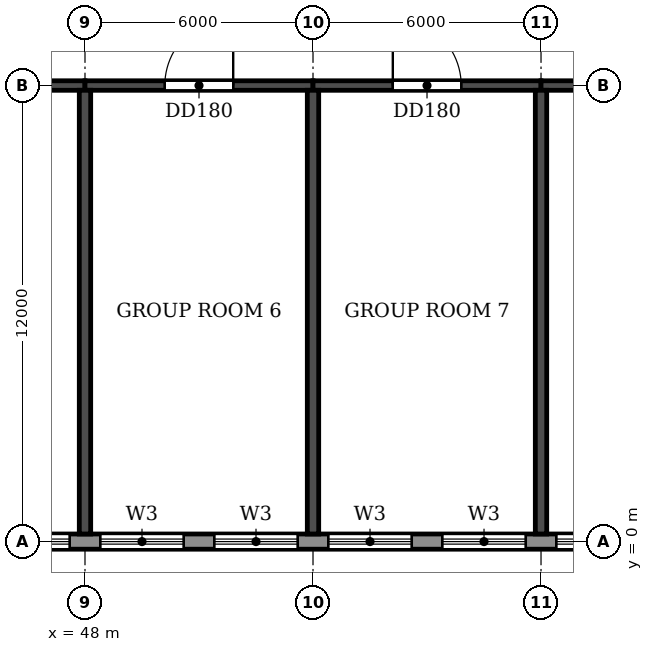
"""IFC4 building model, lengths in metres.
Left out: names, types, materials, properties, quantities, classifications, styles, units other than length and angle.
Written with IfcOpenShell. Run it as: python <this file> out.ifc"""

import sys

from ifc_helpers import new_model, si_unit, direction, frame, frame_2d, origin, place, context, subcontext, project, spatial, rectangle, extrude, element, fill, save


model = new_model("IFC4")
c1 = context("Model", 3, precision=1e-05, world=origin(), true_north=direction((0.0, 1.0)))
c2 = subcontext(c1, "Body", "Model", "MODEL_VIEW")
j1 = project(units=[si_unit("LENGTHUNIT", "METRE"), si_unit("PLANEANGLEUNIT", "RADIAN")], contexts=[c1])
p1 = place(None, origin())
s1 = spatial("IfcSite", under=j1, at=p1, CompositionType="ELEMENT")
p2 = place(p1, origin())
s2 = spatial("IfcBuilding", under=s1, at=p2, CompositionType="ELEMENT")
p3 = place(p2, frame((0.0, 0.0, 158.7)))
s3 = spatial("IfcBuildingStorey", under=s2, at=p3, CompositionType="ELEMENT", Elevation=158.7)
for number, where, z_axis, x_axis in (
    (1, (48.0, 0.2, 0.0), (0.0, 0.0, 1.0), (0.0, 1.0, 0.0)),
    (2, (54.0, 0.2, 0.0), (0.0, 0.0, 1.0), (0.0, 1.0, 0.0)),
    (3, (60.0, 0.2, 0.0), (0.0, 0.0, 1.0), (0.0, 1.0, 0.0)),
):
    element("IfcWall", number, at=place(p3, frame(where, z_axis=z_axis, x_axis=x_axis)), inside=s3, PredefinedType="SHEAR", context=c2, shape_type="SweptSolid", body=[
        extrude(rectangle(XDim=11.675, YDim=0.3, at=frame_2d((5.837, 0.0))), origin(), (0.0, 0.0, 1.0), 3.07),
    ])
p4 = place(p3, frame((42.0, 12.0, 0.0), z_axis=(0.0, 0.0, 1.0), x_axis=(1.0, 0.0, 0.0)))
e4 = element("IfcWall", 4, at=p4, inside=s3, PredefinedType="SHEAR", context=c2, shape_type="SweptSolid", body=[
    extrude(rectangle(XDim=6.0, YDim=0.25, at=frame_2d((3.0, 0.0))), origin(), (0.0, 0.0, 1.0), 2.47),
])
p5 = place(p4, frame((2.1, 0.0, 0.0)))
e5 = element("IfcOpeningElement", 5, at=p5, cuts=e4, PredefinedType="OPENING", context=c2, shape_type="SweptSolid", body=[
    extrude(rectangle(XDim=1.8, YDim=2.1, at=frame_2d((0.9, 1.05))), frame((0.0, 0.135, 0.0), z_axis=(0.0, -1.0, 0.0), x_axis=(1.0, 0.0, 0.0)), (0.0, 0.0, 1.0), 0.27),
])
p6 = place(p3, frame((48.0, 12.0, 0.0), z_axis=(0.0, 0.0, 1.0), x_axis=(1.0, 0.0, 0.0)))
e6 = element("IfcWall", 6, at=p6, inside=s3, PredefinedType="SHEAR", context=c2, shape_type="SweptSolid", body=[
    extrude(rectangle(XDim=6.0, YDim=0.25, at=frame_2d((3.0, 0.0))), origin(), (0.0, 0.0, 1.0), 2.47),
])
p7 = place(p6, frame((2.1, 0.0, 0.0)))
e7 = element("IfcOpeningElement", 7, at=p7, cuts=e6, PredefinedType="OPENING", context=c2, shape_type="SweptSolid", body=[
    extrude(rectangle(XDim=1.8, YDim=2.1, at=frame_2d((0.9, 1.05))), frame((0.0, 0.135, 0.0), z_axis=(0.0, -1.0, 0.0), x_axis=(1.0, 0.0, 0.0)), (0.0, 0.0, 1.0), 0.27),
])
p8 = place(p3, frame((54.0, 12.0, 0.0), z_axis=(0.0, 0.0, 1.0), x_axis=(1.0, 0.0, 0.0)))
e8 = element("IfcWall", 8, at=p8, inside=s3, PredefinedType="SHEAR", context=c2, shape_type="SweptSolid", body=[
    extrude(rectangle(XDim=6.0, YDim=0.25, at=frame_2d((3.0, 0.0))), origin(), (0.0, 0.0, 1.0), 2.47),
])
p9 = place(p8, frame((2.1, 0.0, 0.0)))
e9 = element("IfcOpeningElement", 9, at=p9, cuts=e8, PredefinedType="OPENING", context=c2, shape_type="SweptSolid", body=[
    extrude(rectangle(XDim=1.8, YDim=2.1, at=frame_2d((0.9, 1.05))), frame((0.0, 0.135, 0.0), z_axis=(0.0, -1.0, 0.0), x_axis=(1.0, 0.0, 0.0)), (0.0, 0.0, 1.0), 0.27),
])
p10 = place(p3, frame((60.0, 12.0, 0.0), z_axis=(0.0, 0.0, 1.0), x_axis=(1.0, 0.0, 0.0)))
e10 = element("IfcWall", 10, at=p10, inside=s3, PredefinedType="SHEAR", context=c2, shape_type="SweptSolid", body=[
    extrude(rectangle(XDim=6.0, YDim=0.25, at=frame_2d((3.0, 0.0))), origin(), (0.0, 0.0, 1.0), 2.47),
])
p11 = place(p10, frame((2.1, 0.0, 0.0)))
e11 = element("IfcOpeningElement", 11, at=p11, cuts=e10, PredefinedType="OPENING", context=c2, shape_type="SweptSolid", body=[
    extrude(rectangle(XDim=1.8, YDim=2.1, at=frame_2d((0.9, 1.05))), frame((0.0, 0.135, 0.0), z_axis=(0.0, -1.0, 0.0), x_axis=(1.0, 0.0, 0.0)), (0.0, 0.0, 1.0), 0.27),
])
p12 = place(p3, frame((22.683, 0.0, 0.0), z_axis=(0.0, 0.0, 1.0), x_axis=(1.0, 0.0, 0.0)))
e12 = element("IfcWall", 12, at=p12, inside=s3, PredefinedType="STANDARD", context=c2, shape_type="SweptSolid", body=[
    extrude(rectangle(XDim=56.634, YDim=0.4, at=frame_2d((28.317, 0.0))), origin(), (0.0, 0.0, 1.0), 3.07),
])
p13 = place(p12, frame((1.717, 0.0, 0.6)))
e13 = element("IfcOpeningElement", 13, at=p13, cuts=e12, PredefinedType="OPENING", context=c2, shape_type="SweptSolid", body=[
    extrude(rectangle(XDim=2.2, YDim=1.8, at=frame_2d((1.1, 0.9))), frame((0.0, 0.21, 0.0), z_axis=(0.0, -1.0, 0.0), x_axis=(1.0, 0.0, 0.0)), (0.0, 0.0, 1.0), 0.42),
])
p14 = place(p12, frame((4.717, 0.0, 0.6)))
e14 = element("IfcOpeningElement", 14, at=p14, cuts=e12, PredefinedType="OPENING", context=c2, shape_type="SweptSolid", body=[
    extrude(rectangle(XDim=2.2, YDim=1.8, at=frame_2d((1.1, 0.9))), frame((0.0, 0.21, 0.0), z_axis=(0.0, -1.0, 0.0), x_axis=(1.0, 0.0, 0.0)), (0.0, 0.0, 1.0), 0.42),
])
p15 = place(p12, frame((13.717, 0.0, 0.6)))
e15 = element("IfcOpeningElement", 15, at=p15, cuts=e12, PredefinedType="OPENING", context=c2, shape_type="SweptSolid", body=[
    extrude(rectangle(XDim=2.2, YDim=1.8, at=frame_2d((1.1, 0.9))), frame((0.0, 0.21, 0.0), z_axis=(0.0, -1.0, 0.0), x_axis=(1.0, 0.0, 0.0)), (0.0, 0.0, 1.0), 0.42),
])
p16 = place(p12, frame((16.717, 0.0, 0.6)))
e16 = element("IfcOpeningElement", 16, at=p16, cuts=e12, PredefinedType="OPENING", context=c2, shape_type="SweptSolid", body=[
    extrude(rectangle(XDim=2.2, YDim=1.8, at=frame_2d((1.1, 0.9))), frame((0.0, 0.21, 0.0), z_axis=(0.0, -1.0, 0.0), x_axis=(1.0, 0.0, 0.0)), (0.0, 0.0, 1.0), 0.42),
])
p17 = place(p12, frame((19.717, 0.0, 0.6)))
e17 = element("IfcOpeningElement", 17, at=p17, cuts=e12, PredefinedType="OPENING", context=c2, shape_type="SweptSolid", body=[
    extrude(rectangle(XDim=2.2, YDim=1.8, at=frame_2d((1.1, 0.9))), frame((0.0, 0.21, 0.0), z_axis=(0.0, -1.0, 0.0), x_axis=(1.0, 0.0, 0.0)), (0.0, 0.0, 1.0), 0.42),
])
p18 = place(p12, frame((22.717, 0.0, 0.6)))
e18 = element("IfcOpeningElement", 18, at=p18, cuts=e12, PredefinedType="OPENING", context=c2, shape_type="SweptSolid", body=[
    extrude(rectangle(XDim=2.2, YDim=1.8, at=frame_2d((1.1, 0.9))), frame((0.0, 0.21, 0.0), z_axis=(0.0, -1.0, 0.0), x_axis=(1.0, 0.0, 0.0)), (0.0, 0.0, 1.0), 0.42),
])
p19 = place(p12, frame((25.717, 0.0, 0.6)))
e19 = element("IfcOpeningElement", 19, at=p19, cuts=e12, PredefinedType="OPENING", context=c2, shape_type="SweptSolid", body=[
    extrude(rectangle(XDim=2.2, YDim=1.8, at=frame_2d((1.1, 0.9))), frame((0.0, 0.21, 0.0), z_axis=(0.0, -1.0, 0.0), x_axis=(1.0, 0.0, 0.0)), (0.0, 0.0, 1.0), 0.42),
])
p20 = place(p12, frame((28.717, 0.0, 0.6)))
e20 = element("IfcOpeningElement", 20, at=p20, cuts=e12, PredefinedType="OPENING", context=c2, shape_type="SweptSolid", body=[
    extrude(rectangle(XDim=2.2, YDim=1.8, at=frame_2d((1.1, 0.9))), frame((0.0, 0.21, 0.0), z_axis=(0.0, -1.0, 0.0), x_axis=(1.0, 0.0, 0.0)), (0.0, 0.0, 1.0), 0.42),
])
p21 = place(p12, frame((31.717, 0.0, 0.6)))
e21 = element("IfcOpeningElement", 21, at=p21, cuts=e12, PredefinedType="OPENING", context=c2, shape_type="SweptSolid", body=[
    extrude(rectangle(XDim=2.2, YDim=1.8, at=frame_2d((1.1, 0.9))), frame((0.0, 0.21, 0.0), z_axis=(0.0, -1.0, 0.0), x_axis=(1.0, 0.0, 0.0)), (0.0, 0.0, 1.0), 0.42),
])
p22 = place(p12, frame((34.717, 0.0, 0.6)))
e22 = element("IfcOpeningElement", 22, at=p22, cuts=e12, PredefinedType="OPENING", context=c2, shape_type="SweptSolid", body=[
    extrude(rectangle(XDim=2.2, YDim=1.8, at=frame_2d((1.1, 0.9))), frame((0.0, 0.21, 0.0), z_axis=(0.0, -1.0, 0.0), x_axis=(1.0, 0.0, 0.0)), (0.0, 0.0, 1.0), 0.42),
])
p23 = place(p12, frame((37.717, 0.0, 0.6)))
e23 = element("IfcOpeningElement", 23, at=p23, cuts=e12, PredefinedType="OPENING", context=c2, shape_type="SweptSolid", body=[
    extrude(rectangle(XDim=2.2, YDim=1.8, at=frame_2d((1.1, 0.9))), frame((0.0, 0.21, 0.0), z_axis=(0.0, -1.0, 0.0), x_axis=(1.0, 0.0, 0.0)), (0.0, 0.0, 1.0), 0.42),
])
p24 = place(p12, frame((40.717, 0.0, 0.6)))
e24 = element("IfcOpeningElement", 24, at=p24, cuts=e12, PredefinedType="OPENING", context=c2, shape_type="SweptSolid", body=[
    extrude(rectangle(XDim=2.2, YDim=1.8, at=frame_2d((1.1, 0.9))), frame((0.0, 0.21, 0.0), z_axis=(0.0, -1.0, 0.0), x_axis=(1.0, 0.0, 0.0)), (0.0, 0.0, 1.0), 0.42),
])
p25 = place(p12, frame((43.717, 0.0, 0.6)))
e25 = element("IfcOpeningElement", 25, at=p25, cuts=e12, PredefinedType="OPENING", context=c2, shape_type="SweptSolid", body=[
    extrude(rectangle(XDim=2.2, YDim=1.8, at=frame_2d((1.1, 0.9))), frame((0.0, 0.21, 0.0), z_axis=(0.0, -1.0, 0.0), x_axis=(1.0, 0.0, 0.0)), (0.0, 0.0, 1.0), 0.42),
])
p26 = place(p12, frame((46.717, 0.0, 0.6)))
e26 = element("IfcOpeningElement", 26, at=p26, cuts=e12, PredefinedType="OPENING", context=c2, shape_type="SweptSolid", body=[
    extrude(rectangle(XDim=2.2, YDim=1.8, at=frame_2d((1.1, 0.9))), frame((0.0, 0.21, 0.0), z_axis=(0.0, -1.0, 0.0), x_axis=(1.0, 0.0, 0.0)), (0.0, 0.0, 1.0), 0.42),
])
p27 = place(p12, frame((49.717, 0.0, 0.6)))
e27 = element("IfcOpeningElement", 27, at=p27, cuts=e12, PredefinedType="OPENING", context=c2, shape_type="SweptSolid", body=[
    extrude(rectangle(XDim=2.2, YDim=1.8, at=frame_2d((1.1, 0.9))), frame((0.0, 0.21, 0.0), z_axis=(0.0, -1.0, 0.0), x_axis=(1.0, 0.0, 0.0)), (0.0, 0.0, 1.0), 0.42),
])
p28 = place(p12, frame((52.717, 0.0, 0.6)))
e28 = element("IfcOpeningElement", 28, at=p28, cuts=e12, PredefinedType="OPENING", context=c2, shape_type="SweptSolid", body=[
    extrude(rectangle(XDim=2.2, YDim=1.8, at=frame_2d((1.1, 0.9))), frame((0.0, 0.21, 0.0), z_axis=(0.0, -1.0, 0.0), x_axis=(1.0, 0.0, 0.0)), (0.0, 0.0, 1.0), 0.42),
])
p29 = place(p18, origin())
e29 = element("IfcWindow", 29, at=p29, inside=s3, PartitioningType="DOUBLE_PANEL_HORIZONTAL", PredefinedType="WINDOW", context=c2, shape_type="SweptSolid", body=[
    extrude(rectangle(XDim=2.2, YDim=1.8, at=frame_2d((1.1, 0.9))), frame((0.0, 0.03, 0.0), z_axis=(0.0, -1.0, 0.0), x_axis=(1.0, 0.0, 0.0)), (0.0, 0.0, 1.0), 0.06),
])
fill(e18, e29)
p30 = place(p19, origin())
e30 = element("IfcWindow", 30, at=p30, inside=s3, PartitioningType="DOUBLE_PANEL_HORIZONTAL", PredefinedType="WINDOW", context=c2, shape_type="SweptSolid", body=[
    extrude(rectangle(XDim=2.2, YDim=1.8, at=frame_2d((1.1, 0.9))), frame((0.0, 0.03, 0.0), z_axis=(0.0, -1.0, 0.0), x_axis=(1.0, 0.0, 0.0)), (0.0, 0.0, 1.0), 0.06),
])
fill(e19, e30)
p31 = place(p20, origin())
e31 = element("IfcWindow", 31, at=p31, inside=s3, PartitioningType="DOUBLE_PANEL_HORIZONTAL", PredefinedType="WINDOW", context=c2, shape_type="SweptSolid", body=[
    extrude(rectangle(XDim=2.2, YDim=1.8, at=frame_2d((1.1, 0.9))), frame((0.0, 0.03, 0.0), z_axis=(0.0, -1.0, 0.0), x_axis=(1.0, 0.0, 0.0)), (0.0, 0.0, 1.0), 0.06),
])
fill(e20, e31)
p32 = place(p21, origin())
e32 = element("IfcWindow", 32, at=p32, inside=s3, PartitioningType="DOUBLE_PANEL_HORIZONTAL", PredefinedType="WINDOW", context=c2, shape_type="SweptSolid", body=[
    extrude(rectangle(XDim=2.2, YDim=1.8, at=frame_2d((1.1, 0.9))), frame((0.0, 0.03, 0.0), z_axis=(0.0, -1.0, 0.0), x_axis=(1.0, 0.0, 0.0)), (0.0, 0.0, 1.0), 0.06),
])
fill(e21, e32)
p33 = place(p22, origin())
e33 = element("IfcWindow", 33, at=p33, inside=s3, PartitioningType="DOUBLE_PANEL_HORIZONTAL", PredefinedType="WINDOW", context=c2, shape_type="SweptSolid", body=[
    extrude(rectangle(XDim=2.2, YDim=1.8, at=frame_2d((1.1, 0.9))), frame((0.0, 0.03, 0.0), z_axis=(0.0, -1.0, 0.0), x_axis=(1.0, 0.0, 0.0)), (0.0, 0.0, 1.0), 0.06),
])
fill(e22, e33)
p34 = place(p23, origin())
e34 = element("IfcWindow", 34, at=p34, inside=s3, PartitioningType="DOUBLE_PANEL_HORIZONTAL", PredefinedType="WINDOW", context=c2, shape_type="SweptSolid", body=[
    extrude(rectangle(XDim=2.2, YDim=1.8, at=frame_2d((1.1, 0.9))), frame((0.0, 0.03, 0.0), z_axis=(0.0, -1.0, 0.0), x_axis=(1.0, 0.0, 0.0)), (0.0, 0.0, 1.0), 0.06),
])
fill(e23, e34)
p35 = place(p7, origin())
e35 = element("IfcDoor", 35, at=p35, inside=s3, OperationType="DOUBLE_DOOR_SINGLE_SWING", PredefinedType="DOOR", context=c2, shape_type="SweptSolid", body=[
    extrude(rectangle(XDim=1.8, YDim=2.1, at=frame_2d((0.9, 1.05))), frame((0.0, 0.025, 0.0), z_axis=(0.0, -1.0, 0.0), x_axis=(1.0, 0.0, 0.0)), (0.0, 0.0, 1.0), 0.05),
])
fill(e7, e35)
p36 = place(p9, origin())
e36 = element("IfcDoor", 36, at=p36, inside=s3, OperationType="DOUBLE_DOOR_SINGLE_SWING", PredefinedType="DOOR", context=c2, shape_type="SweptSolid", body=[
    extrude(rectangle(XDim=1.8, YDim=2.1, at=frame_2d((0.9, 1.05))), frame((0.0, 0.025, 0.0), z_axis=(0.0, -1.0, 0.0), x_axis=(1.0, 0.0, 0.0)), (0.0, 0.0, 1.0), 0.05),
])
fill(e9, e36)
save(model, sys.argv[1])
